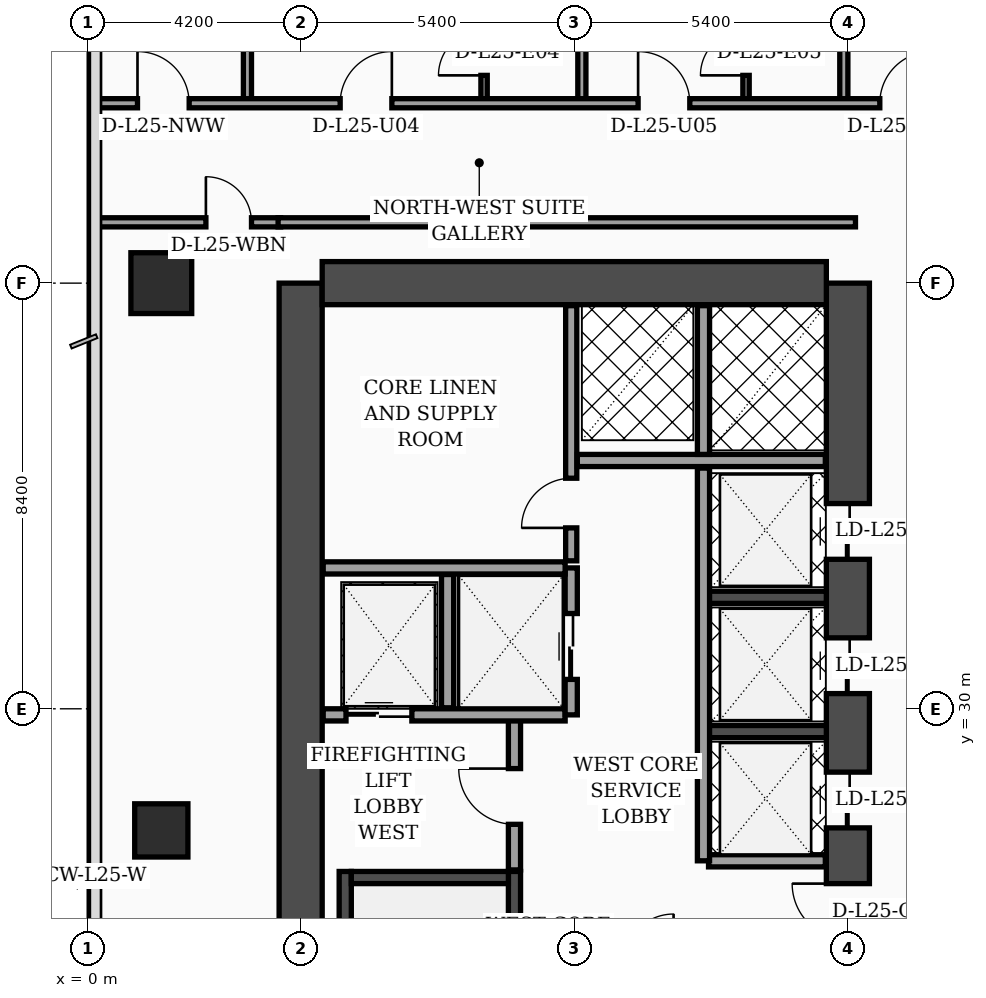
"""IFC4 building model, lengths in metres.
Left out: names, types, materials, properties, quantities, classifications, styles, units other than length and angle.
Written with IfcOpenShell. Run it as: python <this file> out.ifc"""

import sys

from ifc_helpers import new_model, si_unit, direction, frame, frame_2d, origin, origin_2d, place, context, subcontext, project, spatial, rectangle, extrude, element, fill, save


model = new_model("IFC4")
c1 = context("Model", 3, precision=1e-05, world=origin(), true_north=direction((0.0, 1.0)))
c2 = subcontext(c1, "Body", "Model", "MODEL_VIEW")
j1 = project(units=[si_unit("LENGTHUNIT", "METRE"), si_unit("PLANEANGLEUNIT", "RADIAN")], contexts=[c1])
p1 = place(None, origin())
s1 = spatial("IfcSite", under=j1, at=p1, CompositionType="ELEMENT")
p2 = place(p1, origin())
s2 = spatial("IfcBuilding", under=s1, at=p2, CompositionType="ELEMENT")
p3 = place(p2, frame((0.0, 0.0, 105.0)))
s3 = spatial("IfcBuildingStorey", under=s2, at=p3, CompositionType="ELEMENT", Elevation=105.0)
p4 = place(p3, frame((4.2, 16.8, 0.0), z_axis=(0.0, 0.0, 1.0), x_axis=(0.0, 1.0, 0.0)))
e1 = element("IfcWall", 1, at=p4, inside=s3, PredefinedType="SHEAR", context=c2, shape_type="SweptSolid", body=[
    extrude(rectangle(XDim=21.6, YDim=0.85, at=frame_2d((10.8, 0.0))), origin(), (0.0, 0.0, 1.0), 3.56),
])
p5 = place(p3, frame((15.0, 16.8, 0.0), z_axis=(0.0, 0.0, 1.0), x_axis=(0.0, 1.0, 0.0)))
e2 = element("IfcWall", 2, at=p5, inside=s3, PredefinedType="SHEAR", context=c2, shape_type="SweptSolid", body=[
    extrude(rectangle(XDim=21.6, YDim=0.85, at=frame_2d((10.8, 0.0))), origin(), (0.0, 0.0, 1.0), 3.56),
])
p6 = place(p5, frame((8.65, 0.0, 0.0)))
e3 = element("IfcOpeningElement", 3, at=p6, cuts=e2, PredefinedType="OPENING", context=c2, shape_type="SweptSolid", body=[
    extrude(rectangle(XDim=1.1, YDim=2.2, at=frame_2d((0.55, 1.1))), frame((0.0, 0.435, 0.0), z_axis=(0.0, -1.0, 0.0), x_axis=(1.0, 0.0, 0.0)), (0.0, 0.0, 1.0), 0.87),
])
p7 = place(p5, frame((10.85, 0.0, 0.0)))
e4 = element("IfcOpeningElement", 4, at=p7, cuts=e2, PredefinedType="OPENING", context=c2, shape_type="SweptSolid", body=[
    extrude(rectangle(XDim=1.1, YDim=2.2, at=frame_2d((0.55, 1.1))), frame((0.0, 0.435, 0.0), z_axis=(0.0, -1.0, 0.0), x_axis=(1.0, 0.0, 0.0)), (0.0, 0.0, 1.0), 0.87),
])
p8 = place(p5, frame((13.5, 0.0, 0.0)))
e5 = element("IfcOpeningElement", 5, at=p8, cuts=e2, PredefinedType="OPENING", context=c2, shape_type="SweptSolid", body=[
    extrude(rectangle(XDim=1.1, YDim=2.2, at=frame_2d((0.55, 1.1))), frame((0.0, 0.435, 0.0), z_axis=(0.0, -1.0, 0.0), x_axis=(1.0, 0.0, 0.0)), (0.0, 0.0, 1.0), 0.87),
])
p9 = place(p5, frame((16.15, 0.0, 0.0)))
e6 = element("IfcOpeningElement", 6, at=p9, cuts=e2, PredefinedType="OPENING", context=c2, shape_type="SweptSolid", body=[
    extrude(rectangle(XDim=1.1, YDim=2.2, at=frame_2d((0.55, 1.1))), frame((0.0, 0.435, 0.0), z_axis=(0.0, -1.0, 0.0), x_axis=(1.0, 0.0, 0.0)), (0.0, 0.0, 1.0), 0.87),
])
p10 = place(p3, frame((4.625, 38.4, 0.0), z_axis=(0.0, 0.0, 1.0), x_axis=(1.0, 0.0, 0.0)))
e7 = element("IfcWall", 7, at=p10, inside=s3, PredefinedType="SHEAR", context=c2, shape_type="SweptSolid", body=[
    extrude(rectangle(XDim=9.95, YDim=0.85, at=frame_2d((4.975, 0.0))), origin(), (0.0, 0.0, 1.0), 3.56),
])
p11 = place(p3, frame((5.08, 17.225, 0.0), z_axis=(0.0, 0.0, 1.0), x_axis=(0.0, 1.0, 0.0)))
e8 = element("IfcWall", 8, at=p11, inside=s3, PredefinedType="SOLIDWALL", context=c2, shape_type="SweptSolid", body=[
    extrude(rectangle(XDim=9.565, YDim=0.24, at=frame_2d((4.782, 0.0))), origin(), (0.0, 0.0, 1.0), 3.56),
])
p12 = place(p3, frame((8.42, 17.225, 0.0), z_axis=(0.0, 0.0, 1.0), x_axis=(0.0, 1.0, 0.0)))
e9 = element("IfcWall", 9, at=p12, inside=s3, PredefinedType="SOLIDWALL", context=c2, shape_type="SweptSolid", body=[
    extrude(rectangle(XDim=9.565, YDim=0.24, at=frame_2d((4.782, 0.0))), origin(), (0.0, 0.0, 1.0), 3.56),
])
p13 = place(p12, frame((0.35, 0.0, 0.0)))
e10 = element("IfcOpeningElement", 10, at=p13, cuts=e9, PredefinedType="OPENING", context=c2, shape_type="SweptSolid", body=[
    extrude(rectangle(XDim=1.15, YDim=2.2, at=frame_2d((0.575, 1.1))), frame((0.0, 0.13, 0.0), z_axis=(0.0, -1.0, 0.0), x_axis=(1.0, 0.0, 0.0)), (0.0, 0.0, 1.0), 0.26),
])
p14 = place(p3, frame((5.2, 26.67, 0.0), z_axis=(0.0, 0.0, 1.0), x_axis=(1.0, 0.0, 0.0)))
e11 = element("IfcWall", 11, at=p14, inside=s3, PredefinedType="SOLIDWALL", context=c2, shape_type="SweptSolid", body=[
    extrude(rectangle(XDim=3.1, YDim=0.24, at=frame_2d((1.55, 0.0))), origin(), (0.0, 0.0, 1.0), 3.56),
])
for number, where, z_axis, x_axis in (
    (12, (12.18, 29.55, 0.0), (0.0, 0.0, 1.0), (1.0, 0.0, 0.0)),
    (13, (12.18, 32.2, 0.0), (0.0, 0.0, 1.0), (1.0, 0.0, 0.0)),
):
    element("IfcWall", number, at=place(p3, frame(where, z_axis=z_axis, x_axis=x_axis)), inside=s3, PredefinedType="SOLIDWALL", context=c2, shape_type="SweptSolid", body=[
        extrude(rectangle(XDim=2.395, YDim=0.24, at=frame_2d((1.198, 0.0))), origin(), (0.0, 0.0, 1.0), 3.56),
    ])
p15 = place(p3, frame((1.45, 27.6, 0.0), z_axis=(0.0, 0.0, 1.0), x_axis=(1.0, 0.0, 0.0)))
e14 = element("IfcColumn", 14, at=p15, inside=s3, PredefinedType="COLUMN", context=c2, shape_type="SweptSolid", body=[
    extrude(rectangle(XDim=1.05, YDim=1.05, at=origin_2d()), origin(), (0.0, 0.0, 1.0), 3.56),
])
p16 = place(p3, frame((1.45, 38.4, 0.0), z_axis=(0.0, 0.0, 1.0), x_axis=(1.0, 0.0, 0.0)))
e15 = element("IfcColumn", 15, at=p16, inside=s3, PredefinedType="COLUMN", context=c2, shape_type="SweptSolid", body=[
    extrude(rectangle(XDim=1.2, YDim=1.2, at=origin_2d()), origin(), (0.0, 0.0, 1.0), 3.56),
])
p17 = place(p3, frame((8.42, 26.82, 0.0), z_axis=(0.0, 0.0, 1.0), x_axis=(0.0, 1.0, 0.0)))
e16 = element("IfcWall", 16, at=p17, inside=s3, PredefinedType="SOLIDWALL", context=c2, shape_type="SweptSolid", body=[
    extrude(rectangle(XDim=3.0, YDim=0.24, at=frame_2d((1.5, 0.0))), origin(), (0.0, 0.0, 1.0), 3.56),
])
p18 = place(p17, frame((0.9, 0.0, 0.0)))
e17 = element("IfcOpeningElement", 17, at=p18, cuts=e16, PredefinedType="OPENING", context=c2, shape_type="SweptSolid", body=[
    extrude(rectangle(XDim=1.1, YDim=2.2, at=frame_2d((0.55, 1.1))), frame((0.0, 0.13, 0.0), z_axis=(0.0, -1.0, 0.0), x_axis=(1.0, 0.0, 0.0)), (0.0, 0.0, 1.0), 0.26),
])
p19 = place(p3, frame((4.645, 29.88, 0.0), z_axis=(0.0, 0.0, 1.0), x_axis=(1.0, 0.0, 0.0)))
e18 = element("IfcWall", 18, at=p19, inside=s3, PredefinedType="SOLIDWALL", context=c2, shape_type="SweptSolid", body=[
    extrude(rectangle(XDim=4.775, YDim=0.24, at=frame_2d((2.387, 0.0))), origin(), (0.0, 0.0, 1.0), 3.56),
])
p20 = place(p19, frame((0.45, 0.0, 0.0)))
e19 = element("IfcOpeningElement", 19, at=p20, cuts=e18, PredefinedType="OPENING", context=c2, shape_type="SweptSolid", body=[
    extrude(rectangle(XDim=1.3, YDim=2.35, at=frame_2d((0.65, 1.175))), frame((0.0, 0.13, 0.0), z_axis=(0.0, -1.0, 0.0), x_axis=(1.0, 0.0, 0.0)), (0.0, 0.0, 1.0), 0.26),
])
p21 = place(p3, frame((7.1, 30.02, 0.0), z_axis=(0.0, 0.0, 1.0), x_axis=(0.0, 1.0, 0.0)))
e20 = element("IfcWall", 20, at=p21, inside=s3, PredefinedType="SOLIDWALL", context=c2, shape_type="SweptSolid", body=[
    extrude(rectangle(XDim=2.63, YDim=0.24, at=frame_2d((1.315, 0.0))), origin(), (0.0, 0.0, 1.0), 3.56),
])
p22 = place(p3, frame((9.54, 29.88, 0.0), z_axis=(0.0, 0.0, 1.0), x_axis=(0.0, 1.0, 0.0)))
e21 = element("IfcWall", 21, at=p22, inside=s3, PredefinedType="SOLIDWALL", context=c2, shape_type="SweptSolid", body=[
    extrude(rectangle(XDim=2.9, YDim=0.24, at=frame_2d((1.45, 0.0))), origin(), (0.0, 0.0, 1.0), 3.56),
])
p23 = place(p22, frame((0.7, 0.0, 0.0)))
e22 = element("IfcOpeningElement", 22, at=p23, cuts=e21, PredefinedType="OPENING", context=c2, shape_type="SweptSolid", body=[
    extrude(rectangle(XDim=1.3, YDim=2.35, at=frame_2d((0.65, 1.175))), frame((0.0, 0.13, 0.0), z_axis=(0.0, -1.0, 0.0), x_axis=(1.0, 0.0, 0.0)), (0.0, 0.0, 1.0), 0.26),
])
p24 = place(p3, frame((4.645, 32.78, 0.0), z_axis=(0.0, 0.0, 1.0), x_axis=(1.0, 0.0, 0.0)))
e23 = element("IfcWall", 23, at=p24, inside=s3, PredefinedType="SOLIDWALL", context=c2, shape_type="SweptSolid", body=[
    extrude(rectangle(XDim=4.775, YDim=0.24, at=frame_2d((2.387, 0.0))), origin(), (0.0, 0.0, 1.0), 3.19),
])
p25 = place(p3, frame((9.54, 32.92, 0.0), z_axis=(0.0, 0.0, 1.0), x_axis=(0.0, 1.0, 0.0)))
e24 = element("IfcWall", 24, at=p25, inside=s3, PredefinedType="SOLIDWALL", context=c2, shape_type="SweptSolid", body=[
    extrude(rectangle(XDim=5.035, YDim=0.22, at=frame_2d((2.518, 0.0))), origin(), (0.0, 0.0, 1.0), 3.56),
])
p26 = place(p25, frame((0.65, 0.0, 0.0)))
e25 = element("IfcOpeningElement", 25, at=p26, cuts=e24, PredefinedType="OPENING", context=c2, shape_type="SweptSolid", body=[
    extrude(rectangle(XDim=0.98, YDim=2.15, at=frame_2d((0.49, 1.075))), frame((0.0, 0.12, 0.0), z_axis=(0.0, -1.0, 0.0), x_axis=(1.0, 0.0, 0.0)), (0.0, 0.0, 1.0), 0.24),
])
p27 = place(p3, frame((12.25, 27.0, 0.0), z_axis=(0.0, 0.0, 1.0), x_axis=(1.0, 0.0, 0.0)))
e26 = element("IfcWall", 26, at=p27, inside=s3, PredefinedType="SOLIDWALL", context=c2, shape_type="SweptSolid", body=[
    extrude(rectangle(XDim=2.305, YDim=0.24, at=frame_2d((1.152, 0.0))), origin(), (0.0, 0.0, 1.0), 3.56),
])
p28 = place(p3, frame((12.15, 27.0, 0.0), z_axis=(0.0, 0.0, 1.0), x_axis=(0.0, 1.0, 0.0)))
e27 = element("IfcWall", 27, at=p28, inside=s3, PredefinedType="SOLIDWALL", context=c2, shape_type="SweptSolid", body=[
    extrude(rectangle(XDim=7.75, YDim=0.24, at=frame_2d((3.875, 0.0))), origin(), (0.0, 0.0, 1.0), 3.56),
])
p29 = place(p3, frame((9.66, 34.9, 0.0), z_axis=(0.0, 0.0, 1.0), x_axis=(1.0, 0.0, 0.0)))
e28 = element("IfcWall", 28, at=p29, inside=s3, PredefinedType="SOLIDWALL", context=c2, shape_type="SweptSolid", body=[
    extrude(rectangle(XDim=4.895, YDim=0.24, at=frame_2d((2.448, 0.0))), origin(), (0.0, 0.0, 1.0), 3.56),
])
p30 = place(p3, frame((12.15, 35.02, 0.0), z_axis=(0.0, 0.0, 1.0), x_axis=(0.0, 1.0, 0.0)))
e29 = element("IfcWall", 29, at=p30, inside=s3, PredefinedType="SOLIDWALL", context=c2, shape_type="SweptSolid", body=[
    extrude(rectangle(XDim=2.935, YDim=0.24, at=frame_2d((1.468, 0.0))), origin(), (0.0, 0.0, 1.0), 3.56),
])
p31 = place(p3, frame((0.08, 39.6, 0.0), z_axis=(0.0, 0.0, 1.0), x_axis=(1.0, 0.0, 0.0)))
e30 = element("IfcWall", 30, at=p31, inside=s3, PredefinedType="PARTITIONING", context=c2, shape_type="SweptSolid", body=[
    extrude(rectangle(XDim=3.725, YDim=0.18, at=frame_2d((1.862, 0.0))), origin(), (0.0, 0.0, 1.0), 2.84),
])
p32 = place(p31, frame((2.25, 0.0, 0.0)))
e31 = element("IfcOpeningElement", 31, at=p32, cuts=e30, PredefinedType="OPENING", context=c2, shape_type="SweptSolid", body=[
    extrude(rectangle(XDim=0.9, YDim=2.15, at=frame_2d((0.45, 1.075))), frame((0.0, 0.1, 0.0), z_axis=(0.0, -1.0, 0.0), x_axis=(1.0, 0.0, 0.0)), (0.0, 0.0, 1.0), 0.2),
])
p33 = place(p3, frame((3.15, 41.95, 0.0), z_axis=(0.0, 0.0, 1.0), x_axis=(0.0, 1.0, 0.0)))
e32 = element("IfcWall", 32, at=p33, inside=s3, PredefinedType="PARTITIONING", context=c2, shape_type="SweptSolid", body=[
    extrude(rectangle(XDim=5.85, YDim=0.16, at=frame_2d((2.925, 0.0))), origin(), (0.0, 0.0, 1.0), 3.14),
])
p34 = place(p3, frame((14.92, 41.95, 0.0), z_axis=(0.0, 0.0, 1.0), x_axis=(0.0, 1.0, 0.0)))
e33 = element("IfcWall", 33, at=p34, inside=s3, PredefinedType="PARTITIONING", context=c2, shape_type="SweptSolid", body=[
    extrude(rectangle(XDim=5.85, YDim=0.16, at=frame_2d((2.925, 0.0))), origin(), (0.0, 0.0, 1.0), 3.04),
])
p35 = place(p3, frame((7.82, 41.95, 0.0), z_axis=(0.0, 0.0, 1.0), x_axis=(0.0, 1.0, 0.0)))
e34 = element("IfcWall", 34, at=p35, inside=s3, PredefinedType="PARTITIONING", context=c2, shape_type="SweptSolid", body=[
    extrude(rectangle(XDim=8.99, YDim=0.125, at=frame_2d((4.495, 0.0))), origin(), (0.0, 0.0, 1.0), 3.04),
])
p36 = place(p35, frame((0.55, 0.0, 0.0)))
e35 = element("IfcOpeningElement", 35, at=p36, cuts=e34, PredefinedType="OPENING", context=c2, shape_type="SweptSolid", body=[
    extrude(rectangle(XDim=0.9, YDim=2.15, at=frame_2d((0.45, 1.075))), frame((0.0, 0.073, 0.0), z_axis=(0.0, -1.0, 0.0), x_axis=(1.0, 0.0, 0.0)), (0.0, 0.0, 1.0), 0.145),
])
p37 = place(p35, frame((4.88, 0.0, 0.0)))
e36 = element("IfcOpeningElement", 36, at=p37, cuts=e34, PredefinedType="OPENING", context=c2, shape_type="SweptSolid", body=[
    extrude(rectangle(XDim=0.96, YDim=2.2, at=frame_2d((0.48, 1.1))), frame((0.0, 0.073, 0.0), z_axis=(0.0, -1.0, 0.0), x_axis=(1.0, 0.0, 0.0)), (0.0, 0.0, 1.0), 0.145),
])
p38 = place(p3, frame((12.99, 41.95, 0.0), z_axis=(0.0, 0.0, 1.0), x_axis=(0.0, 1.0, 0.0)))
e37 = element("IfcWall", 37, at=p38, inside=s3, PredefinedType="PARTITIONING", context=c2, shape_type="SweptSolid", body=[
    extrude(rectangle(XDim=8.99, YDim=0.125, at=frame_2d((4.495, 0.0))), origin(), (0.0, 0.0, 1.0), 3.04),
])
p39 = place(p38, frame((0.55, 0.0, 0.0)))
e38 = element("IfcOpeningElement", 38, at=p39, cuts=e37, PredefinedType="OPENING", context=c2, shape_type="SweptSolid", body=[
    extrude(rectangle(XDim=0.9, YDim=2.15, at=frame_2d((0.45, 1.075))), frame((0.0, 0.073, 0.0), z_axis=(0.0, -1.0, 0.0), x_axis=(1.0, 0.0, 0.0)), (0.0, 0.0, 1.0), 0.145),
])
p40 = place(p38, frame((3.62, 0.0, 0.0)))
e39 = element("IfcOpeningElement", 39, at=p40, cuts=e37, PredefinedType="OPENING", context=c2, shape_type="SweptSolid", body=[
    extrude(rectangle(XDim=0.96, YDim=2.2, at=frame_2d((0.48, 1.1))), frame((0.0, 0.073, 0.0), z_axis=(0.0, -1.0, 0.0), x_axis=(1.0, 0.0, 0.0)), (0.0, 0.0, 1.0), 0.145),
])
p41 = place(p3, frame((9.75, 41.95, 0.0), z_axis=(0.0, 0.0, 1.0), x_axis=(0.0, 1.0, 0.0)))
e40 = element("IfcWall", 40, at=p41, inside=s3, PredefinedType="PARTITIONING", context=c2, shape_type="SweptSolid", body=[
    extrude(rectangle(XDim=8.99, YDim=0.16, at=frame_2d((4.495, 0.0))), origin(), (0.0, 0.0, 1.0), 3.04),
])
p42 = place(p3, frame((0.08, 41.95, 0.0), z_axis=(0.0, 0.0, 1.0), x_axis=(1.0, 0.0, 0.0)))
e41 = element("IfcWall", 41, at=p42, inside=s3, PredefinedType="PARTITIONING", context=c2, shape_type="SweptSolid", body=[
    extrude(rectangle(XDim=17.77, YDim=0.18, at=frame_2d((8.885, 0.0))), origin(), (0.0, 0.0, 1.0), 2.84),
])
p43 = place(p42, frame((0.9, 0.0, 0.0)))
e42 = element("IfcOpeningElement", 42, at=p43, cuts=e41, PredefinedType="OPENING", context=c2, shape_type="SweptSolid", body=[
    extrude(rectangle(XDim=1.02, YDim=2.2, at=frame_2d((0.51, 1.1))), frame((0.0, 0.1, 0.0), z_axis=(0.0, -1.0, 0.0), x_axis=(1.0, 0.0, 0.0)), (0.0, 0.0, 1.0), 0.2),
])
p44 = place(p42, frame((4.9, 0.0, 0.0)))
e43 = element("IfcOpeningElement", 43, at=p44, cuts=e41, PredefinedType="OPENING", context=c2, shape_type="SweptSolid", body=[
    extrude(rectangle(XDim=1.02, YDim=2.2, at=frame_2d((0.51, 1.1))), frame((0.0, 0.1, 0.0), z_axis=(0.0, -1.0, 0.0), x_axis=(1.0, 0.0, 0.0)), (0.0, 0.0, 1.0), 0.2),
])
p45 = place(p42, frame((10.78, 0.0, 0.0)))
e44 = element("IfcOpeningElement", 44, at=p45, cuts=e41, PredefinedType="OPENING", context=c2, shape_type="SweptSolid", body=[
    extrude(rectangle(XDim=1.02, YDim=2.2, at=frame_2d((0.51, 1.1))), frame((0.0, 0.1, 0.0), z_axis=(0.0, -1.0, 0.0), x_axis=(1.0, 0.0, 0.0)), (0.0, 0.0, 1.0), 0.2),
])
p46 = place(p42, frame((15.55, 0.0, 0.0)))
e45 = element("IfcOpeningElement", 45, at=p46, cuts=e41, PredefinedType="OPENING", context=c2, shape_type="SweptSolid", body=[
    extrude(rectangle(XDim=1.02, YDim=2.2, at=frame_2d((0.51, 1.1))), frame((0.0, 0.1, 0.0), z_axis=(0.0, -1.0, 0.0), x_axis=(1.0, 0.0, 0.0)), (0.0, 0.0, 1.0), 0.2),
])
p47 = place(p3, frame((3.755, 39.6, 0.0), z_axis=(0.0, 0.0, 1.0), x_axis=(1.0, 0.0, 0.0)))
e46 = element("IfcWall", 46, at=p47, inside=s3, PredefinedType="PARTITIONING", context=c2, shape_type="SweptSolid", body=[
    extrude(rectangle(XDim=11.395, YDim=0.18, at=frame_2d((5.698, 0.0))), origin(), (0.0, 0.0, 1.0), 2.84),
])
p48 = place(p18, origin())
e47 = element("IfcDoor", 47, at=p48, inside=s3, OperationType="SINGLE_SWING_RIGHT", PredefinedType="DOOR", context=c2, shape_type="SweptSolid", body=[
    extrude(rectangle(XDim=1.1, YDim=2.2, at=frame_2d((0.55, 1.1))), frame((0.0, 0.025, 0.0), z_axis=(0.0, -1.0, 0.0), x_axis=(1.0, 0.0, 0.0)), (0.0, 0.0, 1.0), 0.05),
])
fill(e17, e47)
p49 = place(p20, origin())
e48 = element("IfcDoor", 48, at=p49, inside=s3, OperationType="DOUBLE_DOOR_SLIDING", PredefinedType="DOOR", context=c2, shape_type="SweptSolid", body=[
    extrude(rectangle(XDim=1.3, YDim=2.35, at=frame_2d((0.65, 1.175))), frame((0.0, 0.025, 0.0), z_axis=(0.0, -1.0, 0.0), x_axis=(1.0, 0.0, 0.0)), (0.0, 0.0, 1.0), 0.05),
])
fill(e19, e48)
p50 = place(p23, origin())
e49 = element("IfcDoor", 49, at=p50, inside=s3, OperationType="DOUBLE_DOOR_SLIDING", PredefinedType="DOOR", context=c2, shape_type="SweptSolid", body=[
    extrude(rectangle(XDim=1.3, YDim=2.35, at=frame_2d((0.65, 1.175))), frame((0.0, 0.025, 0.0), z_axis=(0.0, -1.0, 0.0), x_axis=(1.0, 0.0, 0.0)), (0.0, 0.0, 1.0), 0.05),
])
fill(e22, e49)
p51 = place(p26, origin())
e50 = element("IfcDoor", 50, at=p51, inside=s3, OperationType="SINGLE_SWING_LEFT", PredefinedType="DOOR", context=c2, shape_type="SweptSolid", body=[
    extrude(rectangle(XDim=0.98, YDim=2.15, at=frame_2d((0.49, 1.075))), frame((0.0, 0.025, 0.0), z_axis=(0.0, -1.0, 0.0), x_axis=(1.0, 0.0, 0.0)), (0.0, 0.0, 1.0), 0.05),
])
fill(e25, e50)
p52 = place(p32, origin())
e51 = element("IfcDoor", 51, at=p52, inside=s3, OperationType="SINGLE_SWING_LEFT", PredefinedType="DOOR", context=c2, shape_type="SweptSolid", body=[
    extrude(rectangle(XDim=0.9, YDim=2.15, at=frame_2d((0.45, 1.075))), frame((0.0, 0.025, 0.0), z_axis=(0.0, -1.0, 0.0), x_axis=(1.0, 0.0, 0.0)), (0.0, 0.0, 1.0), 0.05),
])
fill(e31, e51)
p53 = place(p36, origin())
e52 = element("IfcDoor", 52, at=p53, inside=s3, OperationType="SINGLE_SWING_LEFT", PredefinedType="DOOR", context=c2, shape_type="SweptSolid", body=[
    extrude(rectangle(XDim=0.9, YDim=2.15, at=frame_2d((0.45, 1.075))), frame((0.0, 0.025, 0.0), z_axis=(0.0, -1.0, 0.0), x_axis=(1.0, 0.0, 0.0)), (0.0, 0.0, 1.0), 0.05),
])
fill(e35, e52)
p54 = place(p39, origin())
e53 = element("IfcDoor", 53, at=p54, inside=s3, OperationType="SINGLE_SWING_LEFT", PredefinedType="DOOR", context=c2, shape_type="SweptSolid", body=[
    extrude(rectangle(XDim=0.9, YDim=2.15, at=frame_2d((0.45, 1.075))), frame((0.0, 0.025, 0.0), z_axis=(0.0, -1.0, 0.0), x_axis=(1.0, 0.0, 0.0)), (0.0, 0.0, 1.0), 0.05),
])
fill(e38, e53)
p55 = place(p43, origin())
e54 = element("IfcDoor", 54, at=p55, inside=s3, OperationType="SINGLE_SWING_LEFT", PredefinedType="DOOR", context=c2, shape_type="SweptSolid", body=[
    extrude(rectangle(XDim=1.02, YDim=2.2, at=frame_2d((0.51, 1.1))), frame((0.0, 0.025, 0.0), z_axis=(0.0, -1.0, 0.0), x_axis=(1.0, 0.0, 0.0)), (0.0, 0.0, 1.0), 0.05),
])
fill(e42, e54)
p56 = place(p44, origin())
e55 = element("IfcDoor", 55, at=p56, inside=s3, OperationType="SINGLE_SWING_RIGHT", PredefinedType="DOOR", context=c2, shape_type="SweptSolid", body=[
    extrude(rectangle(XDim=1.02, YDim=2.2, at=frame_2d((0.51, 1.1))), frame((0.0, 0.025, 0.0), z_axis=(0.0, -1.0, 0.0), x_axis=(1.0, 0.0, 0.0)), (0.0, 0.0, 1.0), 0.05),
])
fill(e43, e55)
p57 = place(p45, origin())
e56 = element("IfcDoor", 56, at=p57, inside=s3, OperationType="SINGLE_SWING_LEFT", PredefinedType="DOOR", context=c2, shape_type="SweptSolid", body=[
    extrude(rectangle(XDim=1.02, YDim=2.2, at=frame_2d((0.51, 1.1))), frame((0.0, 0.025, 0.0), z_axis=(0.0, -1.0, 0.0), x_axis=(1.0, 0.0, 0.0)), (0.0, 0.0, 1.0), 0.05),
])
fill(e44, e56)
p58 = place(p46, origin())
e57 = element("IfcDoor", 57, at=p58, inside=s3, OperationType="SINGLE_SWING_RIGHT", PredefinedType="DOOR", context=c2, shape_type="SweptSolid", body=[
    extrude(rectangle(XDim=1.02, YDim=2.2, at=frame_2d((0.51, 1.1))), frame((0.0, 0.025, 0.0), z_axis=(0.0, -1.0, 0.0), x_axis=(1.0, 0.0, 0.0)), (0.0, 0.0, 1.0), 0.05),
])
fill(e45, e57)
p59 = place(p6, origin())
e58 = element("IfcDoor", 58, at=p59, inside=s3, OperationType="SINGLE_SWING_RIGHT", PredefinedType="DOOR", context=c2, shape_type="SweptSolid", body=[
    extrude(rectangle(XDim=1.1, YDim=2.2, at=frame_2d((0.55, 1.1))), frame((0.0, 0.025, 0.0), z_axis=(0.0, -1.0, 0.0), x_axis=(1.0, 0.0, 0.0)), (0.0, 0.0, 1.0), 0.05),
])
fill(e3, e58)
p60 = place(p7, origin())
e59 = element("IfcDoor", 59, at=p60, inside=s3, OperationType="DOUBLE_DOOR_SLIDING", PredefinedType="DOOR", context=c2, shape_type="SweptSolid", body=[
    extrude(rectangle(XDim=1.1, YDim=2.2, at=frame_2d((0.55, 1.1))), frame((0.0, 0.025, 0.0), z_axis=(0.0, -1.0, 0.0), x_axis=(1.0, 0.0, 0.0)), (0.0, 0.0, 1.0), 0.05),
])
fill(e4, e59)
p61 = place(p8, origin())
e60 = element("IfcDoor", 60, at=p61, inside=s3, OperationType="DOUBLE_DOOR_SLIDING", PredefinedType="DOOR", context=c2, shape_type="SweptSolid", body=[
    extrude(rectangle(XDim=1.1, YDim=2.2, at=frame_2d((0.55, 1.1))), frame((0.0, 0.025, 0.0), z_axis=(0.0, -1.0, 0.0), x_axis=(1.0, 0.0, 0.0)), (0.0, 0.0, 1.0), 0.05),
])
fill(e5, e60)
p62 = place(p9, origin())
e61 = element("IfcDoor", 61, at=p62, inside=s3, OperationType="DOUBLE_DOOR_SLIDING", PredefinedType="DOOR", context=c2, shape_type="SweptSolid", body=[
    extrude(rectangle(XDim=1.1, YDim=2.2, at=frame_2d((0.55, 1.1))), frame((0.0, 0.025, 0.0), z_axis=(0.0, -1.0, 0.0), x_axis=(1.0, 0.0, 0.0)), (0.0, 0.0, 1.0), 0.05),
])
fill(e6, e61)
save(model, sys.argv[1])
